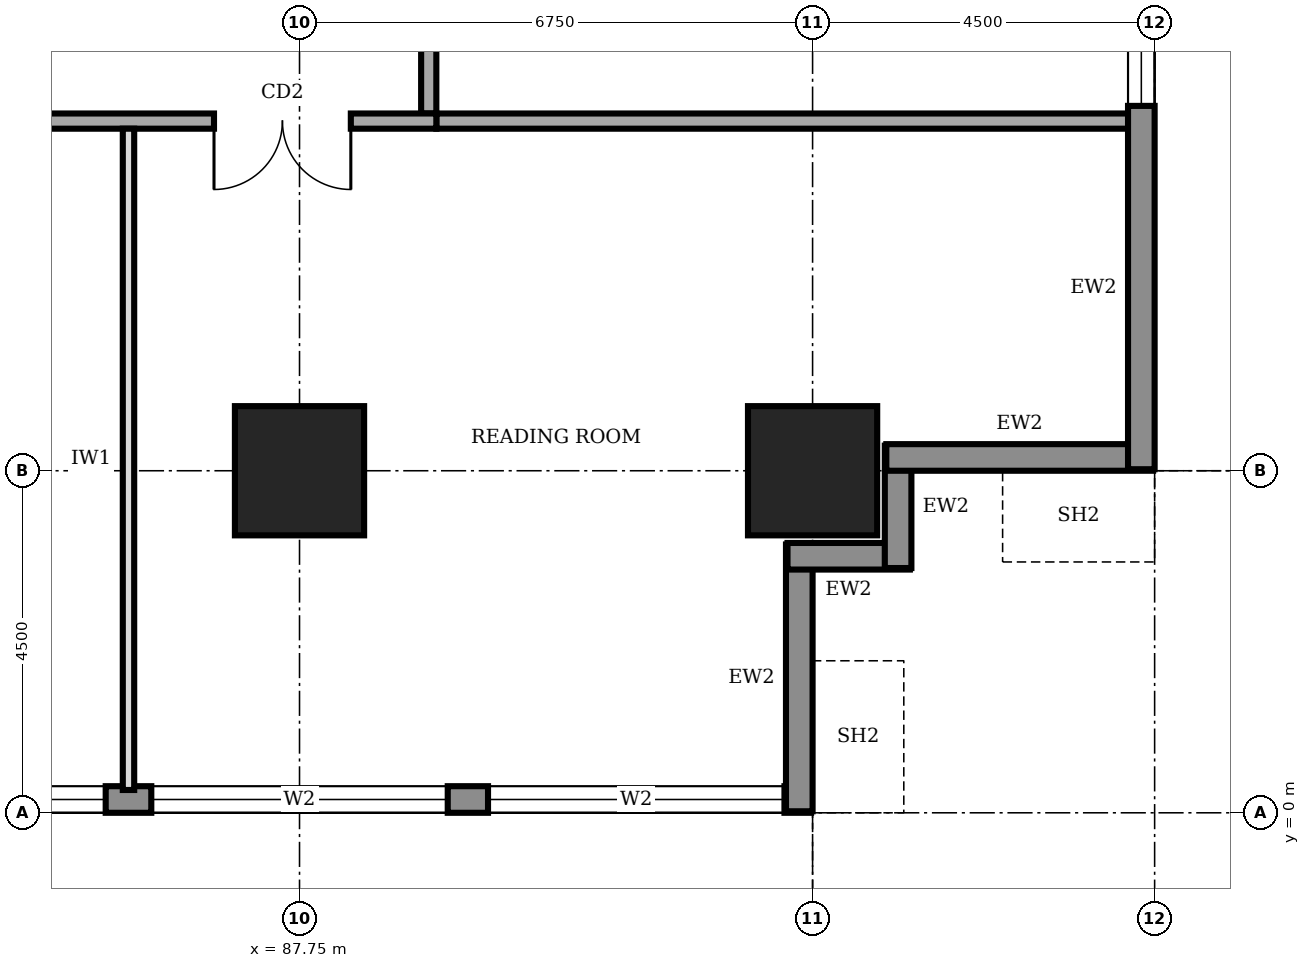
"""IFC4 building model, lengths in metres.
Left out: names, types, materials, properties, quantities, classifications, styles, units other than length and angle.
Written with IfcOpenShell. Run it as: python <this file> out.ifc"""

import sys

from ifc_helpers import new_model, si_unit, direction, frame, frame_2d, origin, origin_2d, place, context, subcontext, project, spatial, rectangle, extrude, element, fill, save


model = new_model("IFC4")
c1 = context("Model", 3, precision=1e-05, world=origin(), true_north=direction((0.0, 1.0)))
c2 = subcontext(c1, "Body", "Model", "MODEL_VIEW")
j1 = project(units=[si_unit("LENGTHUNIT", "METRE"), si_unit("PLANEANGLEUNIT", "RADIAN")], contexts=[c1])
p1 = place(None, origin())
s1 = spatial("IfcSite", under=j1, at=p1, CompositionType="ELEMENT")
p2 = place(p1, origin())
s2 = spatial("IfcBuilding", under=s1, at=p2, CompositionType="ELEMENT")
p3 = place(p2, frame((0.0, 0.0, 49.0)))
s3 = spatial("IfcBuildingStorey", under=s2, at=p3, CompositionType="ELEMENT", Elevation=49.0)
for number, where, z_axis, x_axis in (
    (1, (87.75, 4.5, 0.0), (0.0, 0.0, 1.0), (1.0, 0.0, 0.0)),
    (2, (94.5, 4.5, 0.0), (0.0, 0.0, 1.0), (1.0, 0.0, 0.0)),
):
    element("IfcColumn", number, at=place(p3, frame(where, z_axis=z_axis, x_axis=x_axis)), inside=s3, PredefinedType="COLUMN", context=c2, shape_type="SweptSolid", body=[
        extrude(rectangle(XDim=1.7, YDim=1.7, at=origin_2d()), origin(), (0.0, 0.0, 1.0), 4.0),
    ])
p4 = place(p3, frame((67.52, 0.175, 0.0), z_axis=(0.0, 0.0, 1.0), x_axis=(1.0, 0.0, 0.0)))
e3 = element("IfcWall", 3, at=p4, inside=s3, PredefinedType="STANDARD", context=c2, shape_type="SweptSolid", body=[
    extrude(rectangle(XDim=26.96, YDim=0.35, at=frame_2d((13.48, 0.0))), origin(), (0.0, 0.0, 1.0), 3.75),
])
p5 = place(p4, frame((4.78, 0.0, 0.6)))
e4 = element("IfcOpeningElement", 4, at=p5, cuts=e3, PredefinedType="OPENING", context=c2, shape_type="SweptSolid", body=[
    extrude(rectangle(XDim=3.9, YDim=2.6, at=frame_2d((1.95, 1.3))), frame((0.0, 0.185, 0.0), z_axis=(0.0, -1.0, 0.0), x_axis=(1.0, 0.0, 0.0)), (0.0, 0.0, 1.0), 0.37),
])
p6 = place(p4, frame((9.28, 0.0, 0.6)))
e5 = element("IfcOpeningElement", 5, at=p6, cuts=e3, PredefinedType="OPENING", context=c2, shape_type="SweptSolid", body=[
    extrude(rectangle(XDim=3.9, YDim=2.6, at=frame_2d((1.95, 1.3))), frame((0.0, 0.185, 0.0), z_axis=(0.0, -1.0, 0.0), x_axis=(1.0, 0.0, 0.0)), (0.0, 0.0, 1.0), 0.37),
])
p7 = place(p4, frame((13.78, 0.0, 0.6)))
e6 = element("IfcOpeningElement", 6, at=p7, cuts=e3, PredefinedType="OPENING", context=c2, shape_type="SweptSolid", body=[
    extrude(rectangle(XDim=3.9, YDim=2.6, at=frame_2d((1.95, 1.3))), frame((0.0, 0.185, 0.0), z_axis=(0.0, -1.0, 0.0), x_axis=(1.0, 0.0, 0.0)), (0.0, 0.0, 1.0), 0.37),
])
p8 = place(p4, frame((18.28, 0.0, 0.6)))
e7 = element("IfcOpeningElement", 7, at=p8, cuts=e3, PredefinedType="OPENING", context=c2, shape_type="SweptSolid", body=[
    extrude(rectangle(XDim=3.9, YDim=2.6, at=frame_2d((1.95, 1.3))), frame((0.0, 0.185, 0.0), z_axis=(0.0, -1.0, 0.0), x_axis=(1.0, 0.0, 0.0)), (0.0, 0.0, 1.0), 0.37),
])
p9 = place(p4, frame((22.71, 0.0, 0.6)))
e8 = element("IfcOpeningElement", 8, at=p9, cuts=e3, PredefinedType="OPENING", context=c2, shape_type="SweptSolid", body=[
    extrude(rectangle(XDim=3.9, YDim=2.6, at=frame_2d((1.95, 1.3))), frame((0.0, 0.185, 0.0), z_axis=(0.0, -1.0, 0.0), x_axis=(1.0, 0.0, 0.0)), (0.0, 0.0, 1.0), 0.37),
])
p10 = place(p3, frame((94.325, 0.02, 0.0), z_axis=(0.0, 0.0, 1.0), x_axis=(0.0, 1.0, 0.0)))
e9 = element("IfcWall", 9, at=p10, inside=s3, PredefinedType="STANDARD", context=c2, shape_type="SweptSolid", body=[
    extrude(rectangle(XDim=3.51, YDim=0.35, at=frame_2d((1.755, 0.0))), origin(), (0.0, 0.0, 1.0), 2.85),
])
for number, where, z_axis, x_axis in (
    (10, (94.17, 3.375, 0.0), (0.0, 0.0, 1.0), (1.0, 0.0, 0.0)),
    (11, (95.625, 3.22, 0.0), (0.0, 0.0, 1.0), (0.0, 1.0, 0.0)),
):
    element("IfcWall", number, at=place(p3, frame(where, z_axis=z_axis, x_axis=x_axis)), inside=s3, PredefinedType="STANDARD", context=c2, shape_type="SweptSolid", body=[
        extrude(rectangle(XDim=1.61, YDim=0.35, at=frame_2d((0.805, 0.0))), origin(), (0.0, 0.0, 1.0), 3.75),
    ])
p11 = place(p3, frame((95.47, 4.675, 0.0), z_axis=(0.0, 0.0, 1.0), x_axis=(1.0, 0.0, 0.0)))
e12 = element("IfcWall", 12, at=p11, inside=s3, PredefinedType="STANDARD", context=c2, shape_type="SweptSolid", body=[
    extrude(rectangle(XDim=3.51, YDim=0.35, at=frame_2d((1.755, 0.0))), origin(), (0.0, 0.0, 1.0), 2.85),
])
p12 = place(p3, frame((98.825, 4.52, 0.0), z_axis=(0.0, 0.0, 1.0), x_axis=(0.0, 1.0, 0.0)))
e13 = element("IfcWall", 13, at=p12, inside=s3, PredefinedType="STANDARD", context=c2, shape_type="SweptSolid", body=[
    extrude(rectangle(XDim=31.46, YDim=0.35, at=frame_2d((15.73, 0.0))), origin(), (0.0, 0.0, 1.0), 3.75),
])
p13 = place(p12, frame((4.78, 0.0, 0.6)))
e14 = element("IfcOpeningElement", 14, at=p13, cuts=e13, PredefinedType="OPENING", context=c2, shape_type="SweptSolid", body=[
    extrude(rectangle(XDim=3.9, YDim=2.6, at=frame_2d((1.95, 1.3))), frame((0.0, 0.185, 0.0), z_axis=(0.0, -1.0, 0.0), x_axis=(1.0, 0.0, 0.0)), (0.0, 0.0, 1.0), 0.37),
])
p14 = place(p12, frame((9.28, 0.0, 0.6)))
e15 = element("IfcOpeningElement", 15, at=p14, cuts=e13, PredefinedType="OPENING", context=c2, shape_type="SweptSolid", body=[
    extrude(rectangle(XDim=3.9, YDim=2.6, at=frame_2d((1.95, 1.3))), frame((0.0, 0.185, 0.0), z_axis=(0.0, -1.0, 0.0), x_axis=(1.0, 0.0, 0.0)), (0.0, 0.0, 1.0), 0.37),
])
p15 = place(p12, frame((13.78, 0.0, 0.6)))
e16 = element("IfcOpeningElement", 16, at=p15, cuts=e13, PredefinedType="OPENING", context=c2, shape_type="SweptSolid", body=[
    extrude(rectangle(XDim=3.9, YDim=2.6, at=frame_2d((1.95, 1.3))), frame((0.0, 0.185, 0.0), z_axis=(0.0, -1.0, 0.0), x_axis=(1.0, 0.0, 0.0)), (0.0, 0.0, 1.0), 0.37),
])
p16 = place(p12, frame((18.28, 0.0, 0.6)))
e17 = element("IfcOpeningElement", 17, at=p16, cuts=e13, PredefinedType="OPENING", context=c2, shape_type="SweptSolid", body=[
    extrude(rectangle(XDim=3.9, YDim=2.6, at=frame_2d((1.95, 1.3))), frame((0.0, 0.185, 0.0), z_axis=(0.0, -1.0, 0.0), x_axis=(1.0, 0.0, 0.0)), (0.0, 0.0, 1.0), 0.37),
])
p17 = place(p12, frame((22.78, 0.0, 0.6)))
e18 = element("IfcOpeningElement", 18, at=p17, cuts=e13, PredefinedType="OPENING", context=c2, shape_type="SweptSolid", body=[
    extrude(rectangle(XDim=3.9, YDim=2.6, at=frame_2d((1.95, 1.3))), frame((0.0, 0.185, 0.0), z_axis=(0.0, -1.0, 0.0), x_axis=(1.0, 0.0, 0.0)), (0.0, 0.0, 1.0), 0.37),
])
p18 = place(p12, frame((27.21, 0.0, 0.6)))
e19 = element("IfcOpeningElement", 19, at=p18, cuts=e13, PredefinedType="OPENING", context=c2, shape_type="SweptSolid", body=[
    extrude(rectangle(XDim=3.9, YDim=2.6, at=frame_2d((1.95, 1.3))), frame((0.0, 0.185, 0.0), z_axis=(0.0, -1.0, 0.0), x_axis=(1.0, 0.0, 0.0)), (0.0, 0.0, 1.0), 0.37),
])
p19 = place(p3, frame((71.9, 9.1, 0.0), z_axis=(0.0, 0.0, 1.0), x_axis=(1.0, 0.0, 0.0)))
e20 = element("IfcWall", 20, at=p19, inside=s3, PredefinedType="SOLIDWALL", context=c2, shape_type="SweptSolid", body=[
    extrude(rectangle(XDim=17.65, YDim=0.2, at=frame_2d((8.825, 0.0))), origin(), (0.0, 0.0, 1.0), 3.75),
])
p20 = place(p19, frame((5.8, 0.0, 0.0)))
e21 = element("IfcOpeningElement", 21, at=p20, cuts=e20, PredefinedType="OPENING", context=c2, shape_type="SweptSolid", body=[
    extrude(rectangle(XDim=1.8, YDim=2.1, at=frame_2d((0.9, 1.05))), frame((0.0, 0.11, 0.0), z_axis=(0.0, -1.0, 0.0), x_axis=(1.0, 0.0, 0.0)), (0.0, 0.0, 1.0), 0.22),
])
p21 = place(p19, frame((14.725, 0.0, 0.0)))
e22 = element("IfcOpeningElement", 22, at=p21, cuts=e20, PredefinedType="OPENING", context=c2, shape_type="SweptSolid", body=[
    extrude(rectangle(XDim=1.8, YDim=2.1, at=frame_2d((0.9, 1.05))), frame((0.0, 0.11, 0.0), z_axis=(0.0, -1.0, 0.0), x_axis=(1.0, 0.0, 0.0)), (0.0, 0.0, 1.0), 0.22),
])
p22 = place(p3, frame((89.45, 9.2, 0.0), z_axis=(0.0, 0.0, 1.0), x_axis=(0.0, 1.0, 0.0)))
e23 = element("IfcWall", 23, at=p22, inside=s3, PredefinedType="SOLIDWALL", context=c2, shape_type="SweptSolid", body=[
    extrude(rectangle(XDim=23.05, YDim=0.2, at=frame_2d((11.525, 0.0))), origin(), (0.0, 0.0, 1.0), 3.75),
])
p23 = place(p22, frame((1.55, 0.0, 0.0)))
e24 = element("IfcOpeningElement", 24, at=p23, cuts=e23, PredefinedType="OPENING", context=c2, shape_type="SweptSolid", body=[
    extrude(rectangle(XDim=1.0, YDim=2.1, at=frame_2d((0.5, 1.05))), frame((0.0, 0.11, 0.0), z_axis=(0.0, -1.0, 0.0), x_axis=(1.0, 0.0, 0.0)), (0.0, 0.0, 1.0), 0.22),
])
p24 = place(p22, frame((4.9, 0.0, 0.0)))
e25 = element("IfcOpeningElement", 25, at=p24, cuts=e23, PredefinedType="OPENING", context=c2, shape_type="SweptSolid", body=[
    extrude(rectangle(XDim=1.0, YDim=2.1, at=frame_2d((0.5, 1.05))), frame((0.0, 0.11, 0.0), z_axis=(0.0, -1.0, 0.0), x_axis=(1.0, 0.0, 0.0)), (0.0, 0.0, 1.0), 0.22),
])
p25 = place(p22, frame((8.0, 0.0, 0.0)))
e26 = element("IfcOpeningElement", 26, at=p25, cuts=e23, PredefinedType="OPENING", context=c2, shape_type="SweptSolid", body=[
    extrude(rectangle(XDim=0.9, YDim=2.1, at=frame_2d((0.45, 1.05))), frame((0.0, 0.11, 0.0), z_axis=(0.0, -1.0, 0.0), x_axis=(1.0, 0.0, 0.0)), (0.0, 0.0, 1.0), 0.22),
])
p26 = place(p22, frame((11.05, 0.0, 0.0)))
e27 = element("IfcOpeningElement", 27, at=p26, cuts=e23, PredefinedType="OPENING", context=c2, shape_type="SweptSolid", body=[
    extrude(rectangle(XDim=0.9, YDim=2.1, at=frame_2d((0.45, 1.05))), frame((0.0, 0.11, 0.0), z_axis=(0.0, -1.0, 0.0), x_axis=(1.0, 0.0, 0.0)), (0.0, 0.0, 1.0), 0.22),
])
p27 = place(p22, frame((15.75, 0.0, 0.0)))
e28 = element("IfcOpeningElement", 28, at=p27, cuts=e23, PredefinedType="OPENING", context=c2, shape_type="SweptSolid", body=[
    extrude(rectangle(XDim=0.9, YDim=2.1, at=frame_2d((0.45, 1.05))), frame((0.0, 0.11, 0.0), z_axis=(0.0, -1.0, 0.0), x_axis=(1.0, 0.0, 0.0)), (0.0, 0.0, 1.0), 0.22),
])
p28 = place(p22, frame((13.1, 0.0, 0.0)))
e29 = element("IfcOpeningElement", 29, at=p28, cuts=e23, PredefinedType="OPENING", context=c2, shape_type="SweptSolid", body=[
    extrude(rectangle(XDim=1.0, YDim=2.1, at=frame_2d((0.5, 1.05))), frame((0.0, 0.11, 0.0), z_axis=(0.0, -1.0, 0.0), x_axis=(1.0, 0.0, 0.0)), (0.0, 0.0, 1.0), 0.22),
])
p29 = place(p22, frame((19.925, 0.0, 0.0)))
e30 = element("IfcOpeningElement", 30, at=p29, cuts=e23, PredefinedType="OPENING", context=c2, shape_type="SweptSolid", body=[
    extrude(rectangle(XDim=1.0, YDim=2.1, at=frame_2d((0.5, 1.05))), frame((0.0, 0.11, 0.0), z_axis=(0.0, -1.0, 0.0), x_axis=(1.0, 0.0, 0.0)), (0.0, 0.0, 1.0), 0.22),
])
p30 = place(p3, frame((89.55, 9.1, 0.0), z_axis=(0.0, 0.0, 1.0), x_axis=(1.0, 0.0, 0.0)))
e31 = element("IfcWall", 31, at=p30, inside=s3, PredefinedType="SOLIDWALL", context=c2, shape_type="SweptSolid", body=[
    extrude(rectangle(XDim=9.15, YDim=0.2, at=frame_2d((4.575, 0.0))), origin(), (0.0, 0.0, 1.0), 3.75),
])
p31 = place(p3, frame((85.5, 0.3, 0.0), z_axis=(0.0, 0.0, 1.0), x_axis=(0.0, 1.0, 0.0)))
e32 = element("IfcWall", 32, at=p31, inside=s3, PredefinedType="PARTITIONING", context=c2, shape_type="SweptSolid", body=[
    extrude(rectangle(XDim=8.7, YDim=0.15, at=frame_2d((4.35, 0.0))), origin(), (0.0, 0.0, 1.0), 3.75),
])
p32 = place(p7, origin())
e33 = element("IfcWindow", 33, at=p32, inside=s3, PartitioningType="SINGLE_PANEL", PredefinedType="WINDOW", context=c2, shape_type="SweptSolid", body=[
    extrude(rectangle(XDim=3.9, YDim=2.6, at=frame_2d((1.95, 1.3))), frame((0.0, 0.03, 0.0), z_axis=(0.0, -1.0, 0.0), x_axis=(1.0, 0.0, 0.0)), (0.0, 0.0, 1.0), 0.06),
])
fill(e6, e33)
p33 = place(p8, origin())
e34 = element("IfcWindow", 34, at=p33, inside=s3, PartitioningType="SINGLE_PANEL", PredefinedType="WINDOW", context=c2, shape_type="SweptSolid", body=[
    extrude(rectangle(XDim=3.9, YDim=2.6, at=frame_2d((1.95, 1.3))), frame((0.0, 0.03, 0.0), z_axis=(0.0, -1.0, 0.0), x_axis=(1.0, 0.0, 0.0)), (0.0, 0.0, 1.0), 0.06),
])
fill(e7, e34)
p34 = place(p9, origin())
e35 = element("IfcWindow", 35, at=p34, inside=s3, PartitioningType="SINGLE_PANEL", PredefinedType="WINDOW", context=c2, shape_type="SweptSolid", body=[
    extrude(rectangle(XDim=3.9, YDim=2.6, at=frame_2d((1.95, 1.3))), frame((0.0, 0.03, 0.0), z_axis=(0.0, -1.0, 0.0), x_axis=(1.0, 0.0, 0.0)), (0.0, 0.0, 1.0), 0.06),
])
fill(e8, e35)
p35 = place(p13, origin())
e36 = element("IfcWindow", 36, at=p35, inside=s3, PartitioningType="SINGLE_PANEL", PredefinedType="WINDOW", context=c2, shape_type="SweptSolid", body=[
    extrude(rectangle(XDim=3.9, YDim=2.6, at=frame_2d((1.95, 1.3))), frame((0.0, 0.03, 0.0), z_axis=(0.0, -1.0, 0.0), x_axis=(1.0, 0.0, 0.0)), (0.0, 0.0, 1.0), 0.06),
])
fill(e14, e36)
p36 = place(p21, frame((1.8, 0.0, 0.0), z_axis=(0.0, 0.0, 1.0), x_axis=(-1.0, 0.0, 0.0)))
e37 = element("IfcDoor", 37, at=p36, inside=s3, OperationType="DOUBLE_DOOR_SINGLE_SWING", PredefinedType="DOOR", context=c2, shape_type="SweptSolid", body=[
    extrude(rectangle(XDim=1.8, YDim=2.1, at=frame_2d((0.9, 1.05))), frame((0.0, 0.025, 0.0), z_axis=(0.0, -1.0, 0.0), x_axis=(1.0, 0.0, 0.0)), (0.0, 0.0, 1.0), 0.05),
])
fill(e22, e37)
save(model, sys.argv[1])
